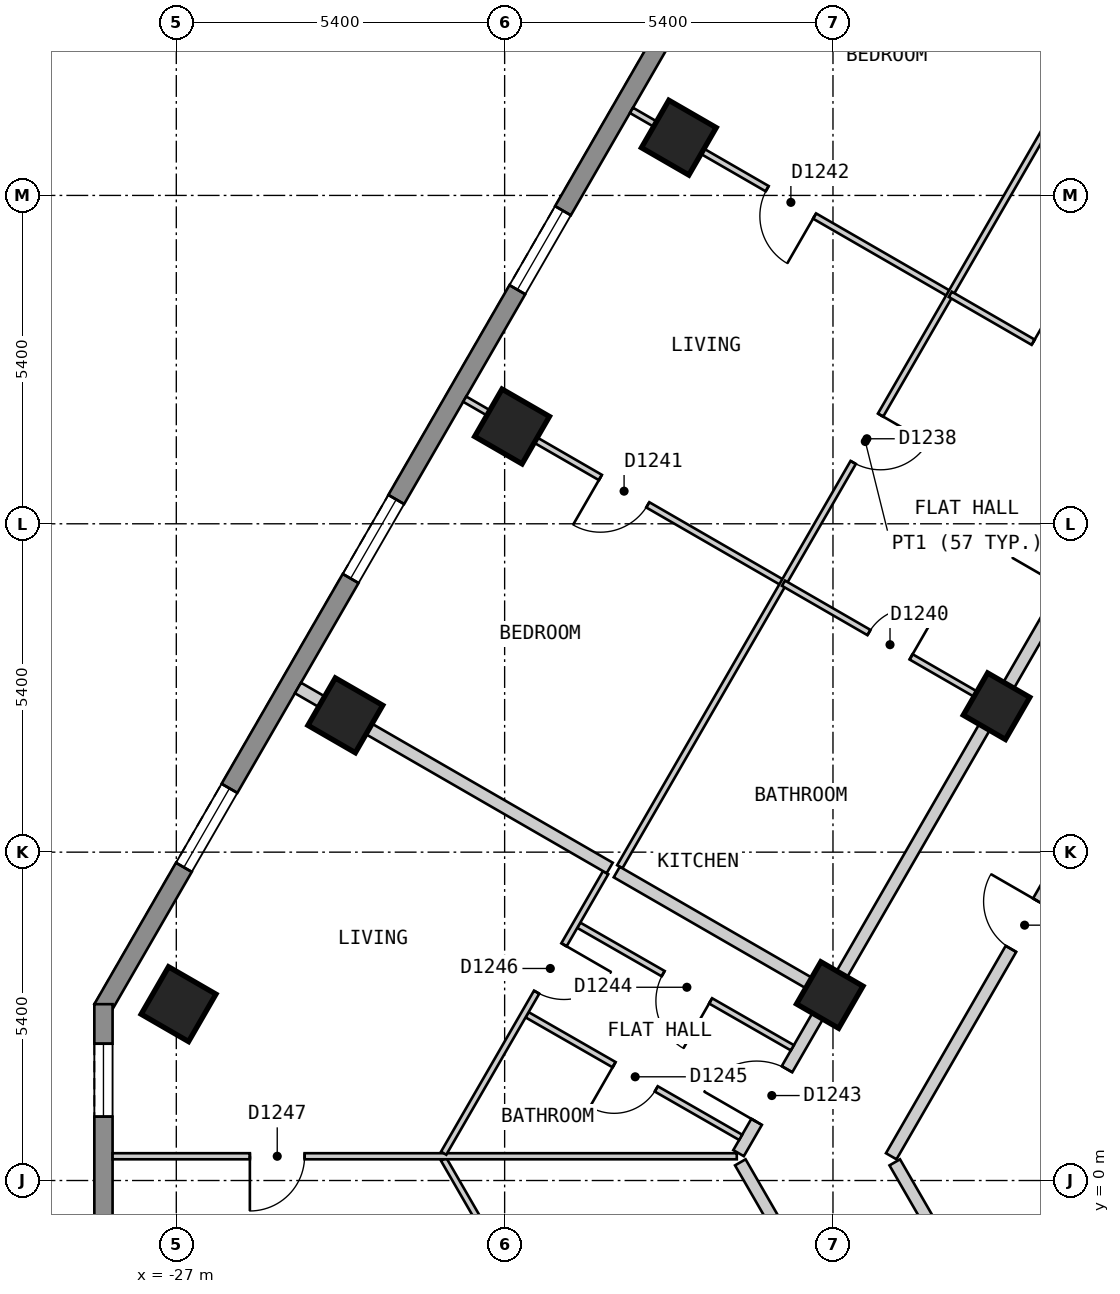
"""IFC4 building model, lengths in metres.
Left out: names, types, materials, properties, quantities, classifications, styles, units other than length and angle.
Written with IfcOpenShell. Run it as: python <this file> out.ifc"""

import sys

from ifc_helpers import new_model, si_unit, direction, frame, frame_2d, origin, origin_2d, place, context, subcontext, project, spatial, polyline, rectangle, outline, extrude, element, fill, save


model = new_model("IFC4")
c1 = context("Model", 3, precision=1e-05, world=origin(), true_north=direction((0.0, 1.0)))
c2 = subcontext(c1, "Body", "Model", "MODEL_VIEW")
j1 = project(units=[si_unit("LENGTHUNIT", "METRE"), si_unit("PLANEANGLEUNIT", "RADIAN")], contexts=[c1])
p1 = place(None, origin())
s1 = spatial("IfcSite", under=j1, at=p1, CompositionType="ELEMENT")
p2 = place(p1, origin())
s2 = spatial("IfcBuilding", under=s1, at=p2, CompositionType="ELEMENT")
p3 = place(p2, frame((0.0, 0.0, 117.6)))
s3 = spatial("IfcBuildingStorey", under=s2, at=p3, CompositionType="ELEMENT", Elevation=117.6)
for number, where, z_axis, x_axis in (
    (1, (-18.735, 17.15, 0.0), (0.0, 0.0, 1.0), (-0.5, -0.866, 0.0)),
    (2, (-21.478, 12.4, 0.0), (0.0, 0.0, 1.0), (-0.5, -0.866, 0.0)),
    (3, (-24.22, 7.65, 0.0), (0.0, 0.0, 1.0), (-0.5, -0.866, 0.0)),
    (4, (-26.963, 2.9, 0.0), (0.0, 0.0, 1.0), (-0.5, -0.866, 0.0)),
):
    element("IfcColumn", number, at=place(p3, frame(where, z_axis=z_axis, x_axis=x_axis)), inside=s3, PredefinedType="COLUMN", context=c2, shape_type="SweptSolid", body=[
        extrude(rectangle(XDim=0.9, YDim=0.9, at=origin_2d()), origin(), (0.0, 0.0, 1.0), 3.0),
    ])
for number, where, z_axis, x_axis in (
    (5, (-13.51, 7.8, 0.0), (0.0, 0.0, 1.0), (-0.5, -0.866, 0.0)),
    (6, (-16.253, 3.05, 0.0), (0.0, 0.0, 1.0), (-0.5, -0.866, 0.0)),
):
    element("IfcColumn", number, at=place(p3, frame(where, z_axis=z_axis, x_axis=x_axis)), inside=s3, PredefinedType="COLUMN", context=c2, shape_type="SweptSolid", body=[
        extrude(rectangle(XDim=0.8, YDim=0.8, at=origin_2d()), origin(), (0.0, 0.0, 1.0), 3.0),
    ])
p4 = place(p3, frame((-16.555, 23.025, 0.0), z_axis=(0.0, 0.0, 1.0), x_axis=(-0.500020536353, -0.866013546791, 0.0)))
e7 = element("IfcWall", 7, at=p4, inside=s3, PredefinedType="SOLIDWALL", context=c2, shape_type="SweptSolid", body=[
    extrude(outline(polyline([(0.0, -0.15), (23.325, -0.15), (23.245, 0.15), (0.08, 0.15), (0.0, -0.15)])), origin(), (0.0, 0.0, 1.0), 2.7),
])
p5 = place(p4, frame((2.685, 0.0, 0.15)))
e8 = element("IfcOpeningElement", 8, at=p5, cuts=e7, PredefinedType="OPENING", context=c2, shape_type="SweptSolid", body=[
    extrude(rectangle(XDim=1.5, YDim=2.1, at=frame_2d((0.75, 1.05))), frame((0.0, 0.16, 0.0), z_axis=(0.0, -1.0, 0.0), x_axis=(1.0, 0.0, 0.0)), (0.0, 0.0, 1.0), 0.32),
])
p6 = place(p4, frame((8.171, 0.0, 0.15)))
e9 = element("IfcOpeningElement", 9, at=p6, cuts=e7, PredefinedType="OPENING", context=c2, shape_type="SweptSolid", body=[
    extrude(rectangle(XDim=1.5, YDim=2.1, at=frame_2d((0.75, 1.05))), frame((0.0, 0.16, 0.0), z_axis=(0.0, -1.0, 0.0), x_axis=(1.0, 0.0, 0.0)), (0.0, 0.0, 1.0), 0.32),
])
p7 = place(p4, frame((13.655, 0.0, 0.15)))
e10 = element("IfcOpeningElement", 10, at=p7, cuts=e7, PredefinedType="OPENING", context=c2, shape_type="SweptSolid", body=[
    extrude(rectangle(XDim=1.5, YDim=2.1, at=frame_2d((0.75, 1.05))), frame((0.0, 0.16, 0.0), z_axis=(0.0, -1.0, 0.0), x_axis=(1.0, 0.0, 0.0)), (0.0, 0.0, 1.0), 0.32),
])
p8 = place(p4, frame((19.14, 0.0, 0.15)))
e11 = element("IfcOpeningElement", 11, at=p8, cuts=e7, PredefinedType="OPENING", context=c2, shape_type="SweptSolid", body=[
    extrude(rectangle(XDim=1.5, YDim=2.1, at=frame_2d((0.75, 1.05))), frame((0.0, 0.16, 0.0), z_axis=(0.0, -1.0, 0.0), x_axis=(1.0, 0.0, 0.0)), (0.0, 0.0, 1.0), 0.32),
])
p9 = place(p3, frame((-28.198, 2.9, 0.0), z_axis=(0.0, 0.0, 1.0), x_axis=(0.0, -1.0, 0.0)))
e12 = element("IfcWall", 12, at=p9, inside=s3, PredefinedType="SOLIDWALL", context=c2, shape_type="SweptSolid", body=[
    extrude(outline(polyline([(0.0, -0.15), (5.0, -0.15), (4.92, 0.15), (0.08, 0.15), (0.0, -0.15)])), origin(), (0.0, 0.0, 1.0), 2.7),
])
p10 = place(p9, frame((0.65, 0.0, 0.15)))
e13 = element("IfcOpeningElement", 13, at=p10, cuts=e12, PredefinedType="OPENING", context=c2, shape_type="SweptSolid", body=[
    extrude(rectangle(XDim=1.2, YDim=2.1, at=frame_2d((0.6, 1.05))), frame((0.0, 0.16, 0.0), z_axis=(0.0, -1.0, 0.0), x_axis=(1.0, 0.0, 0.0)), (0.0, 0.0, 1.0), 0.32),
])
p11 = place(p3, frame((-15.184, 0.299, 0.0), z_axis=(0.0, 0.0, 1.0), x_axis=(0.500149577091, -0.865939028186, 0.0)))
e14 = element("IfcWall", 14, at=p11, inside=s3, PredefinedType="PARTITIONING", context=c2, shape_type="SweptSolid", body=[
    extrude(rectangle(XDim=3.463, YDim=0.2, at=frame_2d((1.732, 0.0))), origin(), (0.0, 0.0, 1.0), 2.7),
])
p12 = place(p3, frame((-17.724, 0.299, 0.0), z_axis=(0.0, 0.0, 1.0), x_axis=(0.499910220442, -0.866077231832, 0.0)))
e15 = element("IfcWall", 15, at=p12, inside=s3, PredefinedType="PARTITIONING", context=c2, shape_type="SweptSolid", body=[
    extrude(rectangle(XDim=3.189, YDim=0.2, at=frame_2d((1.594, 0.0))), origin(), (0.0, 0.0, 1.0), 2.7),
])
p13 = place(p3, frame((-15.242, 0.399, 0.0), z_axis=(0.0, 0.0, 1.0), x_axis=(0.499953615651, 0.866052182145, 0.0)))
e16 = element("IfcWall", 16, at=p13, inside=s3, PredefinedType="PARTITIONING", context=c2, shape_type="SweptSolid", body=[
    extrude(rectangle(XDim=8.777, YDim=0.2, at=frame_2d((4.388, 0.0))), origin(), (0.0, 0.0, 1.0), 2.7),
])
p14 = place(p13, frame((3.938, 0.0, 0.0)))
e17 = element("IfcOpeningElement", 17, at=p14, cuts=e16, PredefinedType="OPENING", context=c2, shape_type="SweptSolid", body=[
    extrude(rectangle(XDim=0.9, YDim=2.1, at=frame_2d((0.45, 1.05))), frame((0.0, 0.11, 0.0), z_axis=(0.0, -1.0, 0.0), x_axis=(1.0, 0.0, 0.0)), (0.0, 0.0, 1.0), 0.22),
])
p15 = place(p3, frame((-17.753, 0.45, 0.0), z_axis=(0.0, 0.0, 1.0), x_axis=(0.499988552313, 0.866032013009, 0.0)))
e18 = element("IfcWall", 18, at=p15, inside=s3, PredefinedType="PARTITIONING", context=c2, shape_type="SweptSolid", body=[
    extrude(rectangle(XDim=16.917, YDim=0.2, at=frame_2d((8.458, 0.0))), origin(), (0.0, 0.0, 1.0), 2.7),
])
p16 = place(p15, frame((10.73, 0.0, 0.0)))
e19 = element("IfcOpeningElement", 19, at=p16, cuts=e18, PredefinedType="OPENING", context=c2, shape_type="SweptSolid", body=[
    extrude(rectangle(XDim=1.0, YDim=2.1, at=frame_2d((0.5, 1.05))), frame((0.0, 0.11, 0.0), z_axis=(0.0, -1.0, 0.0), x_axis=(1.0, 0.0, 0.0)), (0.0, 0.0, 1.0), 0.22),
])
p17 = place(p15, frame((0.594, 0.0, 0.0)))
e20 = element("IfcOpeningElement", 20, at=p17, cuts=e18, PredefinedType="OPENING", context=c2, shape_type="SweptSolid", body=[
    extrude(rectangle(XDim=1.0, YDim=2.1, at=frame_2d((0.5, 1.05))), frame((0.0, 0.11, 0.0), z_axis=(0.0, -1.0, 0.0), x_axis=(1.0, 0.0, 0.0)), (0.0, 0.0, 1.0), 0.22),
])
p18 = place(p3, frame((-22.603, 0.349, 0.0), z_axis=(0.0, 0.0, 1.0), x_axis=(0.499930403552, -0.866065581584, 0.0)))
e21 = element("IfcWall", 21, at=p18, inside=s3, PredefinedType="PARTITIONING", context=c2, shape_type="SweptSolid", body=[
    extrude(rectangle(XDim=3.117, YDim=0.1, at=frame_2d((1.558, 0.0))), origin(), (0.0, 0.0, 1.0), 2.7),
])
p19 = place(p3, frame((-20.381, 4.198, 0.0), z_axis=(0.0, 0.0, 1.0), x_axis=(0.867459321792, -0.497508115549, 0.0)))
e22 = element("IfcWall", 22, at=p19, inside=s3, PredefinedType="PARTITIONING", context=c2, shape_type="SweptSolid", body=[
    extrude(rectangle(XDim=4.05, YDim=0.1, at=frame_2d((2.025, 0.0))), origin(), (0.0, 0.0, 1.0), 2.7),
])
p20 = place(p19, frame((1.6, 0.0, 0.0)))
e23 = element("IfcOpeningElement", 23, at=p20, cuts=e22, PredefinedType="OPENING", context=c2, shape_type="SweptSolid", body=[
    extrude(rectangle(XDim=0.9, YDim=2.1, at=frame_2d((0.45, 1.05))), frame((0.0, 0.06, 0.0), z_axis=(0.0, -1.0, 0.0), x_axis=(1.0, 0.0, 0.0)), (0.0, 0.0, 1.0), 0.12),
])
p21 = place(p3, frame((-21.231, 2.726, 0.0), z_axis=(0.0, 0.0, 1.0), x_axis=(0.867314299312, -0.497760892607, 0.0)))
e24 = element("IfcWall", 24, at=p21, inside=s3, PredefinedType="PARTITIONING", context=c2, shape_type="SweptSolid", body=[
    extrude(rectangle(XDim=4.05, YDim=0.1, at=frame_2d((2.025, 0.0))), origin(), (0.0, 0.0, 1.0), 2.7),
])
p22 = place(p21, frame((1.65, 0.0, 0.0)))
e25 = element("IfcOpeningElement", 25, at=p22, cuts=e24, PredefinedType="OPENING", context=c2, shape_type="SweptSolid", body=[
    extrude(rectangle(XDim=0.8, YDim=2.1, at=frame_2d((0.4, 1.05))), frame((0.0, 0.06, 0.0), z_axis=(0.0, -1.0, 0.0), x_axis=(1.0, 0.0, 0.0)), (0.0, 0.0, 1.0), 0.12),
])
p23 = place(p3, frame((-22.257, 12.85, 0.0), z_axis=(0.0, 0.0, 1.0), x_axis=(0.866028448709, -0.499994725999, 0.0)))
e26 = element("IfcWall", 26, at=p23, inside=s3, PredefinedType="PARTITIONING", context=c2, shape_type="SweptSolid", body=[
    extrude(rectangle(XDim=6.054, YDim=0.1, at=frame_2d((3.027, 0.0))), origin(), (0.0, 0.0, 1.0), 2.7),
])
p24 = place(p23, frame((2.577, 0.0, 0.0)))
e27 = element("IfcOpeningElement", 27, at=p24, cuts=e26, PredefinedType="OPENING", context=c2, shape_type="SweptSolid", body=[
    extrude(rectangle(XDim=0.9, YDim=2.1, at=frame_2d((0.45, 1.05))), frame((0.0, 0.06, 0.0), z_axis=(0.0, -1.0, 0.0), x_axis=(1.0, 0.0, 0.0)), (0.0, 0.0, 1.0), 0.12),
])
p25 = place(p3, frame((-19.514, 17.599, 0.0), z_axis=(0.0, 0.0, 1.0), x_axis=(0.866088213453, -0.49989119468, 0.0)))
e28 = element("IfcWall", 28, at=p25, inside=s3, PredefinedType="PARTITIONING", context=c2, shape_type="SweptSolid", body=[
    extrude(rectangle(XDim=6.053, YDim=0.1, at=frame_2d((3.027, 0.0))), origin(), (0.0, 0.0, 1.0), 2.7),
])
p26 = place(p25, frame((2.577, 0.0, 0.0)))
e29 = element("IfcOpeningElement", 29, at=p26, cuts=e28, PredefinedType="OPENING", context=c2, shape_type="SweptSolid", body=[
    extrude(rectangle(XDim=0.9, YDim=2.1, at=frame_2d((0.45, 1.05))), frame((0.0, 0.06, 0.0), z_axis=(0.0, -1.0, 0.0), x_axis=(1.0, 0.0, 0.0)), (0.0, 0.0, 1.0), 0.12),
])
p27 = place(p3, frame((-28.048, 0.399, 0.0), z_axis=(0.0, 0.0, 1.0), x_axis=(1.0, 0.0, 0.0)))
e30 = element("IfcWall", 30, at=p27, inside=s3, PredefinedType="PARTITIONING", context=c2, shape_type="SweptSolid", body=[
    extrude(rectangle(XDim=10.266, YDim=0.1, at=frame_2d((5.133, 0.0))), origin(), (0.0, 0.0, 1.0), 2.7),
])
p28 = place(p27, frame((2.258, 0.0, 0.0)))
e31 = element("IfcOpeningElement", 31, at=p28, cuts=e30, PredefinedType="OPENING", context=c2, shape_type="SweptSolid", body=[
    extrude(rectangle(XDim=0.9, YDim=2.1, at=frame_2d((0.45, 1.05))), frame((0.0, 0.06, 0.0), z_axis=(0.0, -1.0, 0.0), x_axis=(1.0, 0.0, 0.0)), (0.0, 0.0, 1.0), 0.12),
])
p29 = place(p3, frame((-19.706, 5.16, 0.0), z_axis=(0.0, 0.0, 1.0), x_axis=(0.500003799672, 0.866023210032, 0.0)))
e32 = element("IfcWall", 32, at=p29, inside=s3, PredefinedType="PARTITIONING", context=c2, shape_type="SweptSolid", body=[
    extrude(rectangle(XDim=16.15, YDim=0.1, at=frame_2d((8.075, 0.0))), origin(), (0.0, 0.0, 1.0), 2.7),
])
p30 = place(p29, frame((7.677, 0.0, 0.0)))
e33 = element("IfcOpeningElement", 33, at=p30, cuts=e32, PredefinedType="OPENING", context=c2, shape_type="SweptSolid", body=[
    extrude(rectangle(XDim=0.9, YDim=2.1, at=frame_2d((0.45, 1.05))), frame((0.0, 0.06, 0.0), z_axis=(0.0, -1.0, 0.0), x_axis=(1.0, 0.0, 0.0)), (0.0, 0.0, 1.0), 0.12),
])
p31 = place(p3, frame((-22.603, 0.449, 0.0), z_axis=(0.0, 0.0, 1.0), x_axis=(0.500022588228, 0.866012362072, 0.0)))
e34 = element("IfcWall", 34, at=p31, inside=s3, PredefinedType="PARTITIONING", context=c2, shape_type="SweptSolid", body=[
    extrude(rectangle(XDim=5.328, YDim=0.1, at=frame_2d((2.664, 0.0))), origin(), (0.0, 0.0, 1.0), 2.7),
])
p32 = place(p31, frame((3.058, 0.0, 0.0)))
e35 = element("IfcOpeningElement", 35, at=p32, cuts=e34, PredefinedType="OPENING", context=c2, shape_type="SweptSolid", body=[
    extrude(rectangle(XDim=0.9, YDim=2.1, at=frame_2d((0.45, 1.05))), frame((0.0, 0.06, 0.0), z_axis=(0.0, -1.0, 0.0), x_axis=(1.0, 0.0, 0.0)), (0.0, 0.0, 1.0), 0.12),
])
p33 = place(p3, frame((-24.999, 8.1, 0.0), z_axis=(0.0, 0.0, 1.0), x_axis=(0.866013897511, -0.50001992892, 0.0)))
e36 = element("IfcWall", 36, at=p33, inside=s3, PredefinedType="PARTITIONING", context=c2, shape_type="SweptSolid", body=[
    extrude(rectangle(XDim=5.92, YDim=0.2, at=frame_2d((2.96, 0.0))), origin(), (0.0, 0.0, 1.0), 2.7),
])
p34 = place(p3, frame((-19.756, 5.073, 0.0), z_axis=(0.0, 0.0, 1.0), x_axis=(0.866014535457, -0.500018824023, 0.0)))
e37 = element("IfcWall", 37, at=p34, inside=s3, PredefinedType="PARTITIONING", context=c2, shape_type="SweptSolid", body=[
    extrude(rectangle(XDim=3.946, YDim=0.2, at=frame_2d((1.973, 0.0))), origin(), (0.0, 0.0, 1.0), 2.7),
])
p35 = place(p3, frame((-17.014, 9.823, 0.0), z_axis=(0.0, 0.0, 1.0), x_axis=(0.866076396086, -0.499911668341, 0.0)))
e38 = element("IfcWall", 38, at=p35, inside=s3, PredefinedType="PARTITIONING", context=c2, shape_type="SweptSolid", body=[
    extrude(rectangle(XDim=3.947, YDim=0.1, at=frame_2d((1.973, 0.0))), origin(), (0.0, 0.0, 1.0), 2.7),
])
p36 = place(p35, frame((1.623, 0.0, 0.0)))
e39 = element("IfcOpeningElement", 39, at=p36, cuts=e38, PredefinedType="OPENING", context=c2, shape_type="SweptSolid", body=[
    extrude(rectangle(XDim=0.8, YDim=2.1, at=frame_2d((0.4, 1.05))), frame((0.0, 0.06, 0.0), z_axis=(0.0, -1.0, 0.0), x_axis=(1.0, 0.0, 0.0)), (0.0, 0.0, 1.0), 0.12),
])
p37 = place(p3, frame((-14.271, 14.573, 0.0), z_axis=(0.0, 0.0, 1.0), x_axis=(0.866014535457, -0.500018824023, 0.0)))
e40 = element("IfcWall", 40, at=p37, inside=s3, PredefinedType="PARTITIONING", context=c2, shape_type="SweptSolid", body=[
    extrude(rectangle(XDim=3.946, YDim=0.1, at=frame_2d((1.973, 0.0))), origin(), (0.0, 0.0, 1.0), 2.7),
])
p38 = place(p37, frame((1.574, 0.0, 0.0)))
e41 = element("IfcOpeningElement", 41, at=p38, cuts=e40, PredefinedType="OPENING", context=c2, shape_type="SweptSolid", body=[
    extrude(rectangle(XDim=0.9, YDim=2.1, at=frame_2d((0.45, 1.05))), frame((0.0, 0.06, 0.0), z_axis=(0.0, -1.0, 0.0), x_axis=(1.0, 0.0, 0.0)), (0.0, 0.0, 1.0), 0.12),
])
p39 = place(p6, origin())
e42 = element("IfcWindow", 42, at=p39, inside=s3, PartitioningType="SINGLE_PANEL", PredefinedType="WINDOW", context=c2, shape_type="SweptSolid", body=[
    extrude(rectangle(XDim=1.5, YDim=2.1, at=frame_2d((0.75, 1.05))), frame((0.0, 0.03, 0.0), z_axis=(0.0, -1.0, 0.0), x_axis=(1.0, 0.0, 0.0)), (0.0, 0.0, 1.0), 0.06),
])
fill(e9, e42)
p40 = place(p7, origin())
e43 = element("IfcWindow", 43, at=p40, inside=s3, PartitioningType="SINGLE_PANEL", PredefinedType="WINDOW", context=c2, shape_type="SweptSolid", body=[
    extrude(rectangle(XDim=1.5, YDim=2.1, at=frame_2d((0.75, 1.05))), frame((0.0, 0.03, 0.0), z_axis=(0.0, -1.0, 0.0), x_axis=(1.0, 0.0, 0.0)), (0.0, 0.0, 1.0), 0.06),
])
fill(e10, e43)
p41 = place(p8, origin())
e44 = element("IfcWindow", 44, at=p41, inside=s3, PartitioningType="SINGLE_PANEL", PredefinedType="WINDOW", context=c2, shape_type="SweptSolid", body=[
    extrude(rectangle(XDim=1.5, YDim=2.1, at=frame_2d((0.75, 1.05))), frame((0.0, 0.03, 0.0), z_axis=(0.0, -1.0, 0.0), x_axis=(1.0, 0.0, 0.0)), (0.0, 0.0, 1.0), 0.06),
])
fill(e11, e44)
p42 = place(p10, origin())
e45 = element("IfcWindow", 45, at=p42, inside=s3, PartitioningType="SINGLE_PANEL", PredefinedType="WINDOW", context=c2, shape_type="SweptSolid", body=[
    extrude(rectangle(XDim=1.2, YDim=2.1, at=frame_2d((0.6, 1.05))), frame((0.0, 0.03, 0.0), z_axis=(0.0, -1.0, 0.0), x_axis=(1.0, 0.0, 0.0)), (0.0, 0.0, 1.0), 0.06),
])
fill(e13, e45)
p43 = place(p30, origin())
e46 = element("IfcDoor", 46, at=p43, inside=s3, OperationType="SINGLE_SWING_RIGHT", PredefinedType="DOOR", context=c2, shape_type="SweptSolid", body=[
    extrude(rectangle(XDim=0.9, YDim=2.1, at=frame_2d((0.45, 1.05))), frame((0.0, 0.025, 0.0), z_axis=(0.0, -1.0, 0.0), x_axis=(1.0, 0.0, 0.0)), (0.0, 0.0, 1.0), 0.05),
])
fill(e33, e46)
p44 = place(p38, origin())
e47 = element("IfcDoor", 47, at=p44, inside=s3, OperationType="SINGLE_SWING_LEFT", PredefinedType="DOOR", context=c2, shape_type="SweptSolid", body=[
    extrude(rectangle(XDim=0.9, YDim=2.1, at=frame_2d((0.45, 1.05))), frame((0.0, 0.025, 0.0), z_axis=(0.0, -1.0, 0.0), x_axis=(1.0, 0.0, 0.0)), (0.0, 0.0, 1.0), 0.05),
])
fill(e41, e47)
p45 = place(p36, origin())
e48 = element("IfcDoor", 48, at=p45, inside=s3, OperationType="SINGLE_SWING_RIGHT", PredefinedType="DOOR", context=c2, shape_type="SweptSolid", body=[
    extrude(rectangle(XDim=0.8, YDim=2.1, at=frame_2d((0.4, 1.05))), frame((0.0, 0.025, 0.0), z_axis=(0.0, -1.0, 0.0), x_axis=(1.0, 0.0, 0.0)), (0.0, 0.0, 1.0), 0.05),
])
fill(e39, e48)
p46 = place(p24, origin())
e49 = element("IfcDoor", 49, at=p46, inside=s3, OperationType="SINGLE_SWING_LEFT", PredefinedType="DOOR", context=c2, shape_type="SweptSolid", body=[
    extrude(rectangle(XDim=0.9, YDim=2.1, at=frame_2d((0.45, 1.05))), frame((0.0, 0.025, 0.0), z_axis=(0.0, -1.0, 0.0), x_axis=(1.0, 0.0, 0.0)), (0.0, 0.0, 1.0), 0.05),
])
fill(e27, e49)
p47 = place(p26, origin())
e50 = element("IfcDoor", 50, at=p47, inside=s3, OperationType="SINGLE_SWING_RIGHT", PredefinedType="DOOR", context=c2, shape_type="SweptSolid", body=[
    extrude(rectangle(XDim=0.9, YDim=2.1, at=frame_2d((0.45, 1.05))), frame((0.0, 0.025, 0.0), z_axis=(0.0, -1.0, 0.0), x_axis=(1.0, 0.0, 0.0)), (0.0, 0.0, 1.0), 0.05),
])
fill(e29, e50)
p48 = place(p17, origin())
e51 = element("IfcDoor", 51, at=p48, inside=s3, OperationType="SINGLE_SWING_LEFT", PredefinedType="DOOR", context=c2, shape_type="SweptSolid", body=[
    extrude(rectangle(XDim=1.0, YDim=2.1, at=frame_2d((0.5, 1.05))), frame((0.0, 0.025, 0.0), z_axis=(0.0, -1.0, 0.0), x_axis=(1.0, 0.0, 0.0)), (0.0, 0.0, 1.0), 0.05),
])
fill(e20, e51)
p49 = place(p20, origin())
e52 = element("IfcDoor", 52, at=p49, inside=s3, OperationType="SINGLE_SWING_RIGHT", PredefinedType="DOOR", context=c2, shape_type="SweptSolid", body=[
    extrude(rectangle(XDim=0.9, YDim=2.1, at=frame_2d((0.45, 1.05))), frame((0.0, 0.025, 0.0), z_axis=(0.0, -1.0, 0.0), x_axis=(1.0, 0.0, 0.0)), (0.0, 0.0, 1.0), 0.05),
])
fill(e23, e52)
p50 = place(p22, origin())
e53 = element("IfcDoor", 53, at=p50, inside=s3, OperationType="SINGLE_SWING_LEFT", PredefinedType="DOOR", context=c2, shape_type="SweptSolid", body=[
    extrude(rectangle(XDim=0.8, YDim=2.1, at=frame_2d((0.4, 1.05))), frame((0.0, 0.025, 0.0), z_axis=(0.0, -1.0, 0.0), x_axis=(1.0, 0.0, 0.0)), (0.0, 0.0, 1.0), 0.05),
])
fill(e25, e53)
p51 = place(p32, origin())
e54 = element("IfcDoor", 54, at=p51, inside=s3, OperationType="SINGLE_SWING_RIGHT", PredefinedType="DOOR", context=c2, shape_type="SweptSolid", body=[
    extrude(rectangle(XDim=0.9, YDim=2.1, at=frame_2d((0.45, 1.05))), frame((0.0, 0.025, 0.0), z_axis=(0.0, -1.0, 0.0), x_axis=(1.0, 0.0, 0.0)), (0.0, 0.0, 1.0), 0.05),
])
fill(e35, e54)
p52 = place(p28, origin())
e55 = element("IfcDoor", 55, at=p52, inside=s3, OperationType="SINGLE_SWING_LEFT", PredefinedType="DOOR", context=c2, shape_type="SweptSolid", body=[
    extrude(rectangle(XDim=0.9, YDim=2.1, at=frame_2d((0.45, 1.05))), frame((0.0, 0.025, 0.0), z_axis=(0.0, -1.0, 0.0), x_axis=(1.0, 0.0, 0.0)), (0.0, 0.0, 1.0), 0.05),
])
fill(e31, e55)
p53 = place(p14, origin())
e56 = element("IfcDoor", 56, at=p53, inside=s3, OperationType="SINGLE_SWING_RIGHT", PredefinedType="DOOR", context=c2, shape_type="SweptSolid", body=[
    extrude(rectangle(XDim=0.9, YDim=2.1, at=frame_2d((0.45, 1.05))), frame((0.0, 0.025, 0.0), z_axis=(0.0, -1.0, 0.0), x_axis=(1.0, 0.0, 0.0)), (0.0, 0.0, 1.0), 0.05),
])
fill(e17, e56)
save(model, sys.argv[1])
